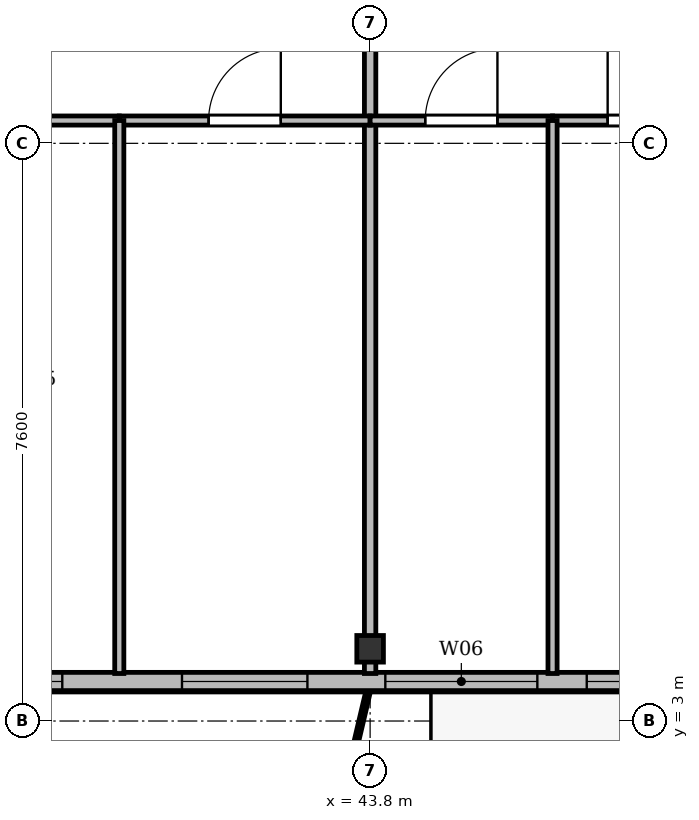
"""IFC4 building model, lengths in metres.
Left out: names, types, materials, properties, quantities, classifications, styles, units other than length and angle.
Written with IfcOpenShell. Run it as: python <this file> out.ifc"""

import sys

from ifc_helpers import new_model, si_unit, direction, frame, frame_2d, origin, origin_2d, place, context, subcontext, project, spatial, rectangle, i_section, extrude, source, transform, mapped, element, fill, save


model = new_model("IFC4")
c1 = context("Model", 3, precision=1e-05, world=origin(), true_north=direction((0.0, 1.0)))
c2 = subcontext(c1, "Body", "Model", "MODEL_VIEW")
j1 = project(units=[si_unit("LENGTHUNIT", "METRE"), si_unit("PLANEANGLEUNIT", "RADIAN")], contexts=[c1])
p1 = place(None, origin())
s1 = spatial("IfcSite", under=j1, at=p1, CompositionType="ELEMENT")
p2 = place(p1, origin())
s2 = spatial("IfcBuilding", under=s1, at=p2, CompositionType="ELEMENT")
p3 = place(p2, frame((0.0, 0.0, 226.5)))
s3 = spatial("IfcBuildingStorey", under=s2, at=p3, CompositionType="ELEMENT", Elevation=226.5)
m1 = source(origin(), c2, "Body", "SweptSolid", [
    extrude(i_section(OverallWidth=0.35, OverallDepth=0.35, WebThickness=0.018, FlangeThickness=0.028, at=origin_2d()), origin(), (0.0, 0.0, 1.0), 3.6),
])
p4 = place(p3, frame((43.8, 3.95, 0.0), z_axis=(0.0, 0.0, 1.0), x_axis=(1.0, 0.0, 0.0)))
e1 = element("IfcColumn", 1, at=p4, inside=s3, PredefinedType="COLUMN", context=c2, shape_type="MappedRepresentation", body=[
    mapped(m1, transform((0.0, 0.0, 0.0), x_axis=(1.0, 0.0, 0.0), y_axis=(0.0, 1.0, 0.0), z_axis=(0.0, 0.0, 1.0), scale=1.0)),
])
p5 = place(p3, frame((63.4, 3.52, 0.0), z_axis=(0.0, 0.0, 1.0), x_axis=(-1.0, 0.0, 0.0)))
e2 = element("IfcWall", 2, at=p5, inside=s3, PredefinedType="SOLIDWALL", context=c2, shape_type="SweptSolid", body=[
    extrude(rectangle(XDim=52.4, YDim=0.24, at=frame_2d((26.2, 0.0))), origin(), (0.0, 0.0, 1.0), 3.36),
])
p6 = place(p5, frame((1.52, 0.0, 0.9)))
e3 = element("IfcOpeningElement", 3, at=p6, cuts=e2, PredefinedType="OPENING", context=c2, shape_type="SweptSolid", body=[
    extrude(rectangle(XDim=1.65, YDim=1.85, at=frame_2d((0.825, 0.925))), frame((0.0, 0.13, 0.0), z_axis=(0.0, -1.0, 0.0), x_axis=(1.0, 0.0, 0.0)), (0.0, 0.0, 1.0), 0.26),
])
p7 = place(p5, frame((7.6, 0.0, 0.9)))
e4 = element("IfcOpeningElement", 4, at=p7, cuts=e2, PredefinedType="OPENING", context=c2, shape_type="SweptSolid", body=[
    extrude(rectangle(XDim=1.8, YDim=1.8, at=frame_2d((0.9, 0.9))), frame((0.0, 0.13, 0.0), z_axis=(0.0, -1.0, 0.0), x_axis=(1.0, 0.0, 0.0)), (0.0, 0.0, 1.0), 0.26),
])
p8 = place(p5, frame((13.42, 0.0, 0.0)))
e5 = element("IfcOpeningElement", 5, at=p8, cuts=e2, PredefinedType="OPENING", context=c2, shape_type="SweptSolid", body=[
    extrude(rectangle(XDim=1.2, YDim=2.2, at=frame_2d((0.6, 1.1))), frame((0.0, 0.13, 0.0), z_axis=(0.0, -1.0, 0.0), x_axis=(1.0, 0.0, 0.0)), (0.0, 0.0, 1.0), 0.26),
])
p9 = place(p5, frame((15.25, 0.0, 0.9)))
e6 = element("IfcOpeningElement", 6, at=p9, cuts=e2, PredefinedType="OPENING", context=c2, shape_type="SweptSolid", body=[
    extrude(rectangle(XDim=1.5, YDim=1.75, at=frame_2d((0.75, 0.875))), frame((0.0, 0.13, 0.0), z_axis=(0.0, -1.0, 0.0), x_axis=(1.0, 0.0, 0.0)), (0.0, 0.0, 1.0), 0.26),
])
p10 = place(p5, frame((17.4, 0.0, 0.9)))
e7 = element("IfcOpeningElement", 7, at=p10, cuts=e2, PredefinedType="OPENING", context=c2, shape_type="SweptSolid", body=[
    extrude(rectangle(XDim=2.0, YDim=1.95, at=frame_2d((1.0, 0.975))), frame((0.0, 0.13, 0.0), z_axis=(0.0, -1.0, 0.0), x_axis=(1.0, 0.0, 0.0)), (0.0, 0.0, 1.0), 0.26),
])
p11 = place(p5, frame((20.425, 0.0, 0.9)))
e8 = element("IfcOpeningElement", 8, at=p11, cuts=e2, PredefinedType="OPENING", context=c2, shape_type="SweptSolid", body=[
    extrude(rectangle(XDim=1.65, YDim=1.85, at=frame_2d((0.825, 0.925))), frame((0.0, 0.13, 0.0), z_axis=(0.0, -1.0, 0.0), x_axis=(1.0, 0.0, 0.0)), (0.0, 0.0, 1.0), 0.26),
])
p12 = place(p5, frame((23.65, 0.0, 0.9)))
e9 = element("IfcOpeningElement", 9, at=p12, cuts=e2, PredefinedType="OPENING", context=c2, shape_type="SweptSolid", body=[
    extrude(rectangle(XDim=1.8, YDim=1.8, at=frame_2d((0.9, 0.9))), frame((0.0, 0.13, 0.0), z_axis=(0.0, -1.0, 0.0), x_axis=(1.0, 0.0, 0.0)), (0.0, 0.0, 1.0), 0.26),
])
p13 = place(p5, frame((28.4, 0.0, 0.9)))
e10 = element("IfcOpeningElement", 10, at=p13, cuts=e2, PredefinedType="OPENING", context=c2, shape_type="SweptSolid", body=[
    extrude(rectangle(XDim=2.2, YDim=1.8, at=frame_2d((1.1, 0.9))), frame((0.0, 0.13, 0.0), z_axis=(0.0, -1.0, 0.0), x_axis=(1.0, 0.0, 0.0)), (0.0, 0.0, 1.0), 0.26),
])
p14 = place(p5, frame((33.85, 0.0, 0.9)))
e11 = element("IfcOpeningElement", 11, at=p14, cuts=e2, PredefinedType="OPENING", context=c2, shape_type="SweptSolid", body=[
    extrude(rectangle(XDim=1.5, YDim=1.75, at=frame_2d((0.75, 0.875))), frame((0.0, 0.13, 0.0), z_axis=(0.0, -1.0, 0.0), x_axis=(1.0, 0.0, 0.0)), (0.0, 0.0, 1.0), 0.26),
])
p15 = place(p5, frame((37.2, 0.0, 0.9)))
e12 = element("IfcOpeningElement", 12, at=p15, cuts=e2, PredefinedType="OPENING", context=c2, shape_type="SweptSolid", body=[
    extrude(rectangle(XDim=2.0, YDim=1.95, at=frame_2d((1.0, 0.975))), frame((0.0, 0.13, 0.0), z_axis=(0.0, -1.0, 0.0), x_axis=(1.0, 0.0, 0.0)), (0.0, 0.0, 1.0), 0.26),
])
p16 = place(p5, frame((41.09, 0.0, 0.0)))
e13 = element("IfcOpeningElement", 13, at=p16, cuts=e2, PredefinedType="OPENING", context=c2, shape_type="SweptSolid", body=[
    extrude(rectangle(XDim=1.2, YDim=2.2, at=frame_2d((0.6, 1.1))), frame((0.0, 0.13, 0.0), z_axis=(0.0, -1.0, 0.0), x_axis=(1.0, 0.0, 0.0)), (0.0, 0.0, 1.0), 0.26),
])
p17 = place(p5, frame((43.0, 0.0, 0.9)))
e14 = element("IfcOpeningElement", 14, at=p17, cuts=e2, PredefinedType="OPENING", context=c2, shape_type="SweptSolid", body=[
    extrude(rectangle(XDim=1.8, YDim=1.8, at=frame_2d((0.9, 0.9))), frame((0.0, 0.13, 0.0), z_axis=(0.0, -1.0, 0.0), x_axis=(1.0, 0.0, 0.0)), (0.0, 0.0, 1.0), 0.26),
])
p18 = place(p5, frame((45.75, 0.0, 0.9)))
e15 = element("IfcOpeningElement", 15, at=p18, cuts=e2, PredefinedType="OPENING", context=c2, shape_type="SweptSolid", body=[
    extrude(rectangle(XDim=1.5, YDim=1.75, at=frame_2d((0.75, 0.875))), frame((0.0, 0.13, 0.0), z_axis=(0.0, -1.0, 0.0), x_axis=(1.0, 0.0, 0.0)), (0.0, 0.0, 1.0), 0.26),
])
p19 = place(p5, frame((49.305, 0.0, 0.9)))
e16 = element("IfcOpeningElement", 16, at=p19, cuts=e2, PredefinedType="OPENING", context=c2, shape_type="SweptSolid", body=[
    extrude(rectangle(XDim=1.5, YDim=1.75, at=frame_2d((0.75, 0.875))), frame((0.0, 0.13, 0.0), z_axis=(0.0, -1.0, 0.0), x_axis=(1.0, 0.0, 0.0)), (0.0, 0.0, 1.0), 0.26),
])
p20 = place(p3, frame((43.8, 3.625, 0.0), z_axis=(0.0, 0.0, 1.0), x_axis=(0.0, 1.0, 0.0)))
e17 = element("IfcWall", 17, at=p20, inside=s3, PredefinedType="PARTITIONING", context=c2, shape_type="SweptSolid", body=[
    extrude(rectangle(XDim=27.375, YDim=0.15, at=frame_2d((13.688, 0.0))), origin(), (0.0, 0.0, 1.0), 2.86),
])
p21 = place(p3, frame((37.2, 10.9, 0.0), z_axis=(0.0, 0.0, 1.0), x_axis=(1.0, 0.0, 0.0)))
e18 = element("IfcWall", 18, at=p21, inside=s3, PredefinedType="PARTITIONING", context=c2, shape_type="SweptSolid", body=[
    extrude(rectangle(XDim=3.3, YDim=0.12, at=frame_2d((1.65, 0.0))), origin(), (0.0, 0.0, 1.0), 3.06),
])
p22 = place(p21, frame((1.175, 0.0, 0.0)))
e19 = element("IfcOpeningElement", 19, at=p22, cuts=e18, PredefinedType="OPENING", context=c2, shape_type="SweptSolid", body=[
    extrude(rectangle(XDim=0.95, YDim=2.15, at=frame_2d((0.475, 1.075))), frame((0.0, 0.07, 0.0), z_axis=(0.0, -1.0, 0.0), x_axis=(1.0, 0.0, 0.0)), (0.0, 0.0, 1.0), 0.14),
])
p23 = place(p3, frame((40.5, 10.9, 0.0), z_axis=(0.0, 0.0, 1.0), x_axis=(1.0, 0.0, 0.0)))
e20 = element("IfcWall", 20, at=p23, inside=s3, PredefinedType="PARTITIONING", context=c2, shape_type="SweptSolid", body=[
    extrude(rectangle(XDim=3.3, YDim=0.12, at=frame_2d((1.65, 0.0))), origin(), (0.0, 0.0, 1.0), 2.86),
])
p24 = place(p23, frame((1.175, 0.0, 0.0)))
e21 = element("IfcOpeningElement", 21, at=p24, cuts=e20, PredefinedType="OPENING", context=c2, shape_type="SweptSolid", body=[
    extrude(rectangle(XDim=0.95, YDim=2.15, at=frame_2d((0.475, 1.075))), frame((0.0, 0.07, 0.0), z_axis=(0.0, -1.0, 0.0), x_axis=(1.0, 0.0, 0.0)), (0.0, 0.0, 1.0), 0.14),
])
p25 = place(p3, frame((40.5, 3.625, 0.0), z_axis=(0.0, 0.0, 1.0), x_axis=(0.0, 1.0, 0.0)))
e22 = element("IfcWall", 22, at=p25, inside=s3, PredefinedType="PARTITIONING", context=c2, shape_type="SweptSolid", body=[
    extrude(rectangle(XDim=7.275, YDim=0.12, at=frame_2d((3.637, 0.0))), origin(), (0.0, 0.0, 1.0), 2.91),
])
p26 = place(p3, frame((43.8, 10.9, 0.0), z_axis=(0.0, 0.0, 1.0), x_axis=(1.0, 0.0, 0.0)))
e23 = element("IfcWall", 23, at=p26, inside=s3, PredefinedType="PARTITIONING", context=c2, shape_type="SweptSolid", body=[
    extrude(rectangle(XDim=2.4, YDim=0.12, at=frame_2d((1.2, 0.0))), origin(), (0.0, 0.0, 1.0), 2.86),
])
p27 = place(p26, frame((0.725, 0.0, 0.0)))
e24 = element("IfcOpeningElement", 24, at=p27, cuts=e23, PredefinedType="OPENING", context=c2, shape_type="SweptSolid", body=[
    extrude(rectangle(XDim=0.95, YDim=2.15, at=frame_2d((0.475, 1.075))), frame((0.0, 0.07, 0.0), z_axis=(0.0, -1.0, 0.0), x_axis=(1.0, 0.0, 0.0)), (0.0, 0.0, 1.0), 0.14),
])
p28 = place(p3, frame((46.2, 10.9, 0.0), z_axis=(0.0, 0.0, 1.0), x_axis=(1.0, 0.0, 0.0)))
e25 = element("IfcWall", 25, at=p28, inside=s3, PredefinedType="PARTITIONING", context=c2, shape_type="SweptSolid", body=[
    extrude(rectangle(XDim=2.4, YDim=0.12, at=frame_2d((1.2, 0.0))), origin(), (0.0, 0.0, 1.0), 3.06),
])
p29 = place(p28, frame((0.725, 0.0, 0.0)))
e26 = element("IfcOpeningElement", 26, at=p29, cuts=e25, PredefinedType="OPENING", context=c2, shape_type="SweptSolid", body=[
    extrude(rectangle(XDim=0.95, YDim=2.15, at=frame_2d((0.475, 1.075))), frame((0.0, 0.07, 0.0), z_axis=(0.0, -1.0, 0.0), x_axis=(1.0, 0.0, 0.0)), (0.0, 0.0, 1.0), 0.14),
])
p30 = place(p3, frame((46.2, 3.625, 0.0), z_axis=(0.0, 0.0, 1.0), x_axis=(0.0, 1.0, 0.0)))
e27 = element("IfcWall", 27, at=p30, inside=s3, PredefinedType="PARTITIONING", context=c2, shape_type="SweptSolid", body=[
    extrude(rectangle(XDim=7.275, YDim=0.12, at=frame_2d((3.637, 0.0))), origin(), (0.0, 0.0, 1.0), 2.91),
])
m2 = source(origin(), c2, "Body", "SweptSolid", [
    extrude(rectangle(XDim=1.5, YDim=1.75, at=frame_2d((0.75, 0.875))), frame((0.0, 0.03, 0.0), z_axis=(0.0, -1.0, 0.0), x_axis=(1.0, 0.0, 0.0)), (0.0, 0.0, 1.0), 0.06),
])
p31 = place(p9, origin())
e28 = element("IfcWindow", 28, at=p31, inside=s3, PartitioningType="SINGLE_PANEL", PredefinedType="WINDOW", context=c2, shape_type="MappedRepresentation", body=[
    mapped(m2, transform((0.0, 0.0, 0.0), x_axis=(1.0, 0.0, 0.0), y_axis=(0.0, 1.0, 0.0), z_axis=(0.0, 0.0, 1.0), scale=1.0)),
])
fill(e6, e28)
m3 = source(origin(), c2, "Body", "SweptSolid", [
    extrude(rectangle(XDim=2.0, YDim=1.95, at=frame_2d((1.0, 0.975))), frame((0.0, 0.03, 0.0), z_axis=(0.0, -1.0, 0.0), x_axis=(1.0, 0.0, 0.0)), (0.0, 0.0, 1.0), 0.06),
])
p32 = place(p10, origin())
e29 = element("IfcWindow", 29, at=p32, inside=s3, PartitioningType="SINGLE_PANEL", PredefinedType="WINDOW", context=c2, shape_type="MappedRepresentation", body=[
    mapped(m3, transform((0.0, 0.0, 0.0), x_axis=(1.0, 0.0, 0.0), y_axis=(0.0, 1.0, 0.0), z_axis=(0.0, 0.0, 1.0), scale=1.0)),
])
fill(e7, e29)
m4 = source(origin(), c2, "Body", "SweptSolid", [
    extrude(rectangle(XDim=1.65, YDim=1.85, at=frame_2d((0.825, 0.925))), frame((0.0, 0.03, 0.0), z_axis=(0.0, -1.0, 0.0), x_axis=(1.0, 0.0, 0.0)), (0.0, 0.0, 1.0), 0.06),
])
p33 = place(p11, origin())
e30 = element("IfcWindow", 30, at=p33, inside=s3, PartitioningType="SINGLE_PANEL", PredefinedType="WINDOW", context=c2, shape_type="MappedRepresentation", body=[
    mapped(m4, transform((0.0, 0.0, 0.0), x_axis=(1.0, 0.0, 0.0), y_axis=(0.0, 1.0, 0.0), z_axis=(0.0, 0.0, 1.0), scale=1.0)),
])
fill(e8, e30)
m5 = source(origin(), c2, "Body", "SweptSolid", [
    extrude(rectangle(XDim=1.8, YDim=1.8, at=frame_2d((0.9, 0.9))), frame((0.0, 0.03, 0.0), z_axis=(0.0, -1.0, 0.0), x_axis=(1.0, 0.0, 0.0)), (0.0, 0.0, 1.0), 0.06),
])
p34 = place(p12, origin())
e31 = element("IfcWindow", 31, at=p34, inside=s3, PartitioningType="SINGLE_PANEL", PredefinedType="WINDOW", context=c2, shape_type="MappedRepresentation", body=[
    mapped(m5, transform((0.0, 0.0, 0.0), x_axis=(1.0, 0.0, 0.0), y_axis=(0.0, 1.0, 0.0), z_axis=(0.0, 0.0, 1.0), scale=1.0)),
])
fill(e9, e31)
m6 = source(origin(), c2, "Body", "SweptSolid", [
    extrude(rectangle(XDim=0.95, YDim=2.15, at=frame_2d((0.475, 1.075))), frame((0.0, 0.025, 0.0), z_axis=(0.0, -1.0, 0.0), x_axis=(1.0, 0.0, 0.0)), (0.0, 0.0, 1.0), 0.05),
])
p35 = place(p24, origin())
e32 = element("IfcDoor", 32, at=p35, inside=s3, OperationType="SINGLE_SWING_RIGHT", PredefinedType="DOOR", context=c2, shape_type="MappedRepresentation", body=[
    mapped(m6, transform((0.0, 0.0, 0.0), x_axis=(1.0, 0.0, 0.0), y_axis=(0.0, 1.0, 0.0), z_axis=(0.0, 0.0, 1.0), scale=1.0)),
])
fill(e21, e32)
p36 = place(p27, origin())
e33 = element("IfcDoor", 33, at=p36, inside=s3, OperationType="SINGLE_SWING_RIGHT", PredefinedType="DOOR", context=c2, shape_type="MappedRepresentation", body=[
    mapped(m6, transform((0.0, 0.0, 0.0), x_axis=(1.0, 0.0, 0.0), y_axis=(0.0, 1.0, 0.0), z_axis=(0.0, 0.0, 1.0), scale=1.0)),
])
fill(e24, e33)
p37 = place(p29, origin())
e34 = element("IfcDoor", 34, at=p37, inside=s3, OperationType="SINGLE_SWING_LEFT", PredefinedType="DOOR", context=c2, shape_type="MappedRepresentation", body=[
    mapped(m6, transform((0.0, 0.0, 0.0), x_axis=(1.0, 0.0, 0.0), y_axis=(0.0, 1.0, 0.0), z_axis=(0.0, 0.0, 1.0), scale=1.0)),
])
fill(e26, e34)
save(model, sys.argv[1])
